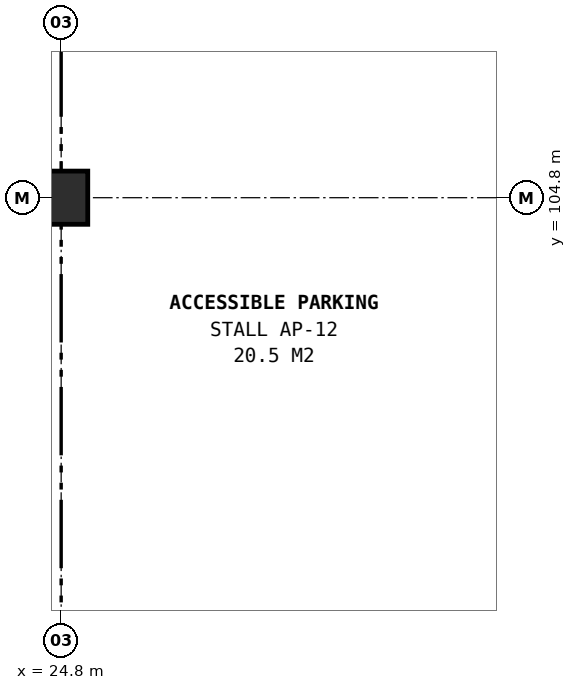
"""IFC4 building model, lengths in metres.
Left out: names, types, materials, properties, quantities, classifications, styles, units other than length and angle.
Written with IfcOpenShell. Run it as: python <this file> out.ifc"""

import sys

from ifc_helpers import new_model, si_unit, direction, frame, origin, origin_2d, place, context, subcontext, project, spatial, rectangle, extrude, element, save


model = new_model("IFC4")
c1 = context("Model", 3, precision=1e-05, world=origin(), true_north=direction((0.0, 1.0)))
c2 = subcontext(c1, "Body", "Model", "MODEL_VIEW")
j1 = project(units=[si_unit("LENGTHUNIT", "METRE"), si_unit("PLANEANGLEUNIT", "RADIAN")], contexts=[c1])
p1 = place(None, origin())
s1 = spatial("IfcSite", under=j1, at=p1, CompositionType="ELEMENT")
p2 = place(p1, origin())
s2 = spatial("IfcBuilding", under=s1, at=p2, CompositionType="ELEMENT")
p3 = place(p2, frame((0.0, 0.0, -4.5)))
s3 = spatial("IfcBuildingStorey", under=s2, at=p3, CompositionType="ELEMENT", Elevation=-4.5)
p4 = place(p3, frame((24.8, 104.8, 0.0), z_axis=(0.0, 0.0, 1.0), x_axis=(1.0, 0.0, 0.0)))
e1 = element("IfcColumn", 1, at=p4, inside=s3, PredefinedType="COLUMN", context=c2, shape_type="SweptSolid", body=[
    extrude(rectangle(XDim=0.7, YDim=0.7, at=origin_2d()), origin(), (0.0, 0.0, 1.0), 4.5),
])
save(model, sys.argv[1])
